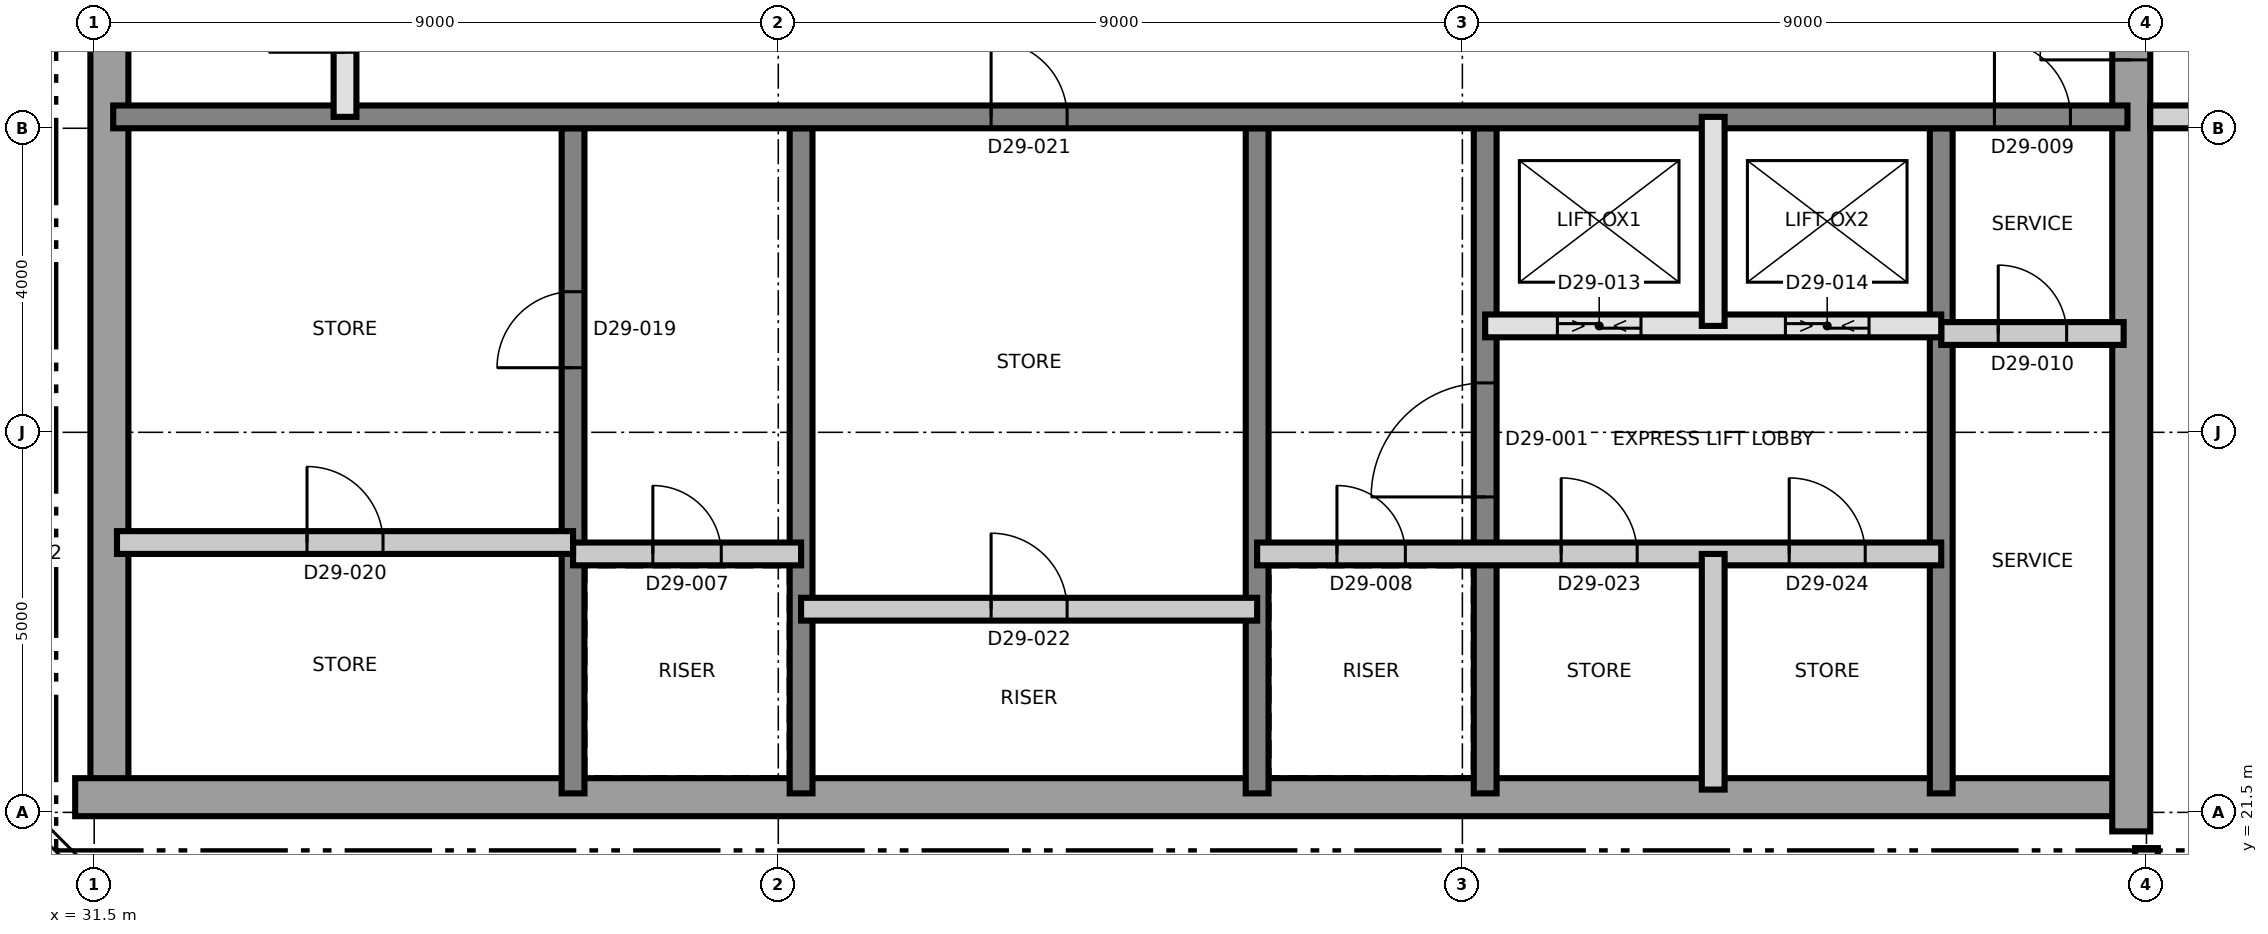
"""IFC4 building model, lengths in metres.
Left out: names, types, materials, properties, quantities, classifications, styles, units other than length and angle.
Written with IfcOpenShell. Run it as: python <this file> out.ifc"""

import sys

from ifc_helpers import new_model, si_unit, direction, frame, frame_2d, origin, place, context, subcontext, project, spatial, rectangle, extrude, element, fill, save


model = new_model("IFC4")
c1 = context("Model", 3, precision=1e-05, world=origin(), true_north=direction((0.0, 1.0)))
c2 = subcontext(c1, "Body", "Model", "MODEL_VIEW")
j1 = project(units=[si_unit("LENGTHUNIT", "METRE"), si_unit("PLANEANGLEUNIT", "RADIAN")], contexts=[c1])
p1 = place(None, origin())
s1 = spatial("IfcSite", under=j1, at=p1, CompositionType="ELEMENT")
p2 = place(p1, origin())
s2 = spatial("IfcBuilding", under=s1, at=p2, CompositionType="ELEMENT")
p3 = place(p2, frame((0.0, 0.0, 254.9)))
s3 = spatial("IfcBuildingStorey", under=s2, at=p3, CompositionType="ELEMENT", Elevation=254.9)
p4 = place(p3, frame((31.7, 21.75, 0.0), z_axis=(0.0, 0.0, 1.0), x_axis=(0.0, 1.0, 0.0)))
e1 = element("IfcWall", 1, at=p4, inside=s3, PredefinedType="SHEAR", context=c2, shape_type="SweptSolid", body=[
    extrude(rectangle(XDim=17.5, YDim=0.5, at=frame_2d((8.75, 0.0))), origin(), (0.0, 0.0, 1.0), 6.0),
])
p5 = place(p3, frame((31.25, 21.7, 0.0), z_axis=(0.0, 0.0, 1.0), x_axis=(1.0, 0.0, 0.0)))
e2 = element("IfcWall", 2, at=p5, inside=s3, PredefinedType="SHEAR", context=c2, shape_type="SweptSolid", body=[
    extrude(rectangle(XDim=27.0, YDim=0.5, at=frame_2d((13.5, 0.0))), origin(), (0.0, 0.0, 1.0), 6.0),
])
p6 = place(p3, frame((58.3, 21.25, 0.0), z_axis=(0.0, 0.0, 1.0), x_axis=(0.0, 1.0, 0.0)))
e3 = element("IfcWall", 3, at=p6, inside=s3, PredefinedType="SHEAR", context=c2, shape_type="SweptSolid", body=[
    extrude(rectangle(XDim=18.5, YDim=0.5, at=frame_2d((9.25, 0.0))), origin(), (0.0, 0.0, 1.0), 6.0),
])
p7 = place(p6, frame((10.15, 0.0, 0.0)))
e4 = element("IfcOpeningElement", 4, at=p7, cuts=e3, PredefinedType="OPENING", context=c2, shape_type="SweptSolid", body=[
    extrude(rectangle(XDim=1.2, YDim=2.1, at=frame_2d((0.6, 1.05))), frame((0.0, 0.26, 0.0), z_axis=(0.0, -1.0, 0.0), x_axis=(1.0, 0.0, 0.0)), (0.0, 0.0, 1.0), 0.52),
])
p8 = place(p3, frame((37.8, 21.75, 0.0), z_axis=(0.0, 0.0, 1.0), x_axis=(0.0, 1.0, 0.0)))
e5 = element("IfcWall", 5, at=p8, inside=s3, PredefinedType="SHEAR", context=c2, shape_type="SweptSolid", body=[
    extrude(rectangle(XDim=8.75, YDim=0.3, at=frame_2d((4.375, 0.0))), origin(), (0.0, 0.0, 1.0), 6.0),
])
p9 = place(p8, frame((5.6, 0.0, 0.0)))
e6 = element("IfcOpeningElement", 6, at=p9, cuts=e5, PredefinedType="OPENING", context=c2, shape_type="SweptSolid", body=[
    extrude(rectangle(XDim=1.0, YDim=2.1, at=frame_2d((0.5, 1.05))), frame((0.0, 0.16, 0.0), z_axis=(0.0, -1.0, 0.0), x_axis=(1.0, 0.0, 0.0)), (0.0, 0.0, 1.0), 0.32),
])
for number, where, z_axis, x_axis in (
    (7, (40.8, 21.75, 0.0), (0.0, 0.0, 1.0), (0.0, 1.0, 0.0)),
    (8, (46.8, 21.75, 0.0), (0.0, 0.0, 1.0), (0.0, 1.0, 0.0)),
):
    element("IfcWall", number, at=place(p3, frame(where, z_axis=z_axis, x_axis=x_axis)), inside=s3, PredefinedType="SHEAR", context=c2, shape_type="SweptSolid", body=[
        extrude(rectangle(XDim=8.75, YDim=0.3, at=frame_2d((4.375, 0.0))), origin(), (0.0, 0.0, 1.0), 6.0),
    ])
p10 = place(p3, frame((49.8, 21.75, 0.0), z_axis=(0.0, 0.0, 1.0), x_axis=(0.0, 1.0, 0.0)))
e9 = element("IfcWall", 9, at=p10, inside=s3, PredefinedType="SHEAR", context=c2, shape_type="SweptSolid", body=[
    extrude(rectangle(XDim=8.75, YDim=0.3, at=frame_2d((4.375, 0.0))), origin(), (0.0, 0.0, 1.0), 6.0),
])
p11 = place(p10, frame((3.9, 0.0, 0.0)))
e10 = element("IfcOpeningElement", 10, at=p11, cuts=e9, PredefinedType="OPENING", context=c2, shape_type="SweptSolid", body=[
    extrude(rectangle(XDim=1.5, YDim=2.1, at=frame_2d((0.75, 1.05))), frame((0.0, 0.16, 0.0), z_axis=(0.0, -1.0, 0.0), x_axis=(1.0, 0.0, 0.0)), (0.0, 0.0, 1.0), 0.32),
])
p12 = place(p3, frame((55.8, 21.75, 0.0), z_axis=(0.0, 0.0, 1.0), x_axis=(0.0, 1.0, 0.0)))
e11 = element("IfcWall", 11, at=p12, inside=s3, PredefinedType="SHEAR", context=c2, shape_type="SweptSolid", body=[
    extrude(rectangle(XDim=8.75, YDim=0.3, at=frame_2d((4.375, 0.0))), origin(), (0.0, 0.0, 1.0), 6.0),
])
p13 = place(p3, frame((31.75, 30.65, 0.0), z_axis=(0.0, 0.0, 1.0), x_axis=(1.0, 0.0, 0.0)))
e12 = element("IfcWall", 12, at=p13, inside=s3, PredefinedType="SHEAR", context=c2, shape_type="SweptSolid", body=[
    extrude(rectangle(XDim=26.5, YDim=0.3, at=frame_2d((13.25, 0.0))), origin(), (0.0, 0.0, 1.0), 6.0),
])
p14 = place(p13, frame((24.75, 0.0, 0.0)))
e13 = element("IfcOpeningElement", 13, at=p14, cuts=e12, PredefinedType="OPENING", context=c2, shape_type="SweptSolid", body=[
    extrude(rectangle(XDim=1.0, YDim=2.1, at=frame_2d((0.5, 1.05))), frame((0.0, 0.16, 0.0), z_axis=(0.0, -1.0, 0.0), x_axis=(1.0, 0.0, 0.0)), (0.0, 0.0, 1.0), 0.32),
])
p15 = place(p13, frame((11.55, 0.0, 0.0)))
e14 = element("IfcOpeningElement", 14, at=p15, cuts=e12, PredefinedType="OPENING", context=c2, shape_type="SweptSolid", body=[
    extrude(rectangle(XDim=1.0, YDim=2.1, at=frame_2d((0.5, 1.05))), frame((0.0, 0.16, 0.0), z_axis=(0.0, -1.0, 0.0), x_axis=(1.0, 0.0, 0.0)), (0.0, 0.0, 1.0), 0.32),
])
p16 = place(p3, frame((40.8, 24.173, 0.0), z_axis=(0.0, 0.0, 1.0), x_axis=(1.0, 0.0, 0.0)))
e15 = element("IfcWall", 15, at=p16, inside=s3, PredefinedType="PARTITIONING", context=c2, shape_type="SweptSolid", body=[
    extrude(rectangle(XDim=6.0, YDim=0.3, at=frame_2d((3.0, 0.0))), origin(), (0.0, 0.0, 1.0), 5.7),
])
p17 = place(p16, frame((2.5, 0.0, 0.0)))
e16 = element("IfcOpeningElement", 16, at=p17, cuts=e15, PredefinedType="OPENING", context=c2, shape_type="SweptSolid", body=[
    extrude(rectangle(XDim=1.0, YDim=2.1, at=frame_2d((0.5, 1.05))), frame((0.0, 0.16, 0.0), z_axis=(0.0, -1.0, 0.0), x_axis=(1.0, 0.0, 0.0)), (0.0, 0.0, 1.0), 0.32),
])
p18 = place(p3, frame((37.8, 24.9, 0.0), z_axis=(0.0, 0.0, 1.0), x_axis=(1.0, 0.0, 0.0)))
e17 = element("IfcWall", 17, at=p18, inside=s3, PredefinedType="PARTITIONING", context=c2, shape_type="SweptSolid", body=[
    extrude(rectangle(XDim=3.0, YDim=0.3, at=frame_2d((1.5, 0.0))), origin(), (0.0, 0.0, 1.0), 5.7),
])
p19 = place(p18, frame((1.05, 0.0, 0.0)))
e18 = element("IfcOpeningElement", 18, at=p19, cuts=e17, PredefinedType="OPENING", context=c2, shape_type="SweptSolid", body=[
    extrude(rectangle(XDim=0.9, YDim=2.1, at=frame_2d((0.45, 1.05))), frame((0.0, 0.16, 0.0), z_axis=(0.0, -1.0, 0.0), x_axis=(1.0, 0.0, 0.0)), (0.0, 0.0, 1.0), 0.32),
])
p20 = place(p3, frame((46.8, 24.9, 0.0), z_axis=(0.0, 0.0, 1.0), x_axis=(1.0, 0.0, 0.0)))
e19 = element("IfcWall", 19, at=p20, inside=s3, PredefinedType="PARTITIONING", context=c2, shape_type="SweptSolid", body=[
    extrude(rectangle(XDim=9.0, YDim=0.3, at=frame_2d((4.5, 0.0))), origin(), (0.0, 0.0, 1.0), 5.7),
])
p21 = place(p20, frame((1.05, 0.0, 0.0)))
e20 = element("IfcOpeningElement", 20, at=p21, cuts=e19, PredefinedType="OPENING", context=c2, shape_type="SweptSolid", body=[
    extrude(rectangle(XDim=0.9, YDim=2.1, at=frame_2d((0.45, 1.05))), frame((0.0, 0.16, 0.0), z_axis=(0.0, -1.0, 0.0), x_axis=(1.0, 0.0, 0.0)), (0.0, 0.0, 1.0), 0.32),
])
p22 = place(p20, frame((4.0, 0.0, 0.0)))
e21 = element("IfcOpeningElement", 21, at=p22, cuts=e19, PredefinedType="OPENING", context=c2, shape_type="SweptSolid", body=[
    extrude(rectangle(XDim=1.0, YDim=2.1, at=frame_2d((0.5, 1.05))), frame((0.0, 0.16, 0.0), z_axis=(0.0, -1.0, 0.0), x_axis=(1.0, 0.0, 0.0)), (0.0, 0.0, 1.0), 0.32),
])
p23 = place(p20, frame((7.0, 0.0, 0.0)))
e22 = element("IfcOpeningElement", 22, at=p23, cuts=e19, PredefinedType="OPENING", context=c2, shape_type="SweptSolid", body=[
    extrude(rectangle(XDim=1.0, YDim=2.1, at=frame_2d((0.5, 1.05))), frame((0.0, 0.16, 0.0), z_axis=(0.0, -1.0, 0.0), x_axis=(1.0, 0.0, 0.0)), (0.0, 0.0, 1.0), 0.32),
])
p24 = place(p3, frame((31.8, 25.05, 0.0), z_axis=(0.0, 0.0, 1.0), x_axis=(1.0, 0.0, 0.0)))
e23 = element("IfcWall", 23, at=p24, inside=s3, PredefinedType="PARTITIONING", context=c2, shape_type="SweptSolid", body=[
    extrude(rectangle(XDim=6.0, YDim=0.3, at=frame_2d((3.0, 0.0))), origin(), (0.0, 0.0, 1.0), 5.7),
])
p25 = place(p24, frame((2.5, 0.0, 0.0)))
e24 = element("IfcOpeningElement", 24, at=p25, cuts=e23, PredefinedType="OPENING", context=c2, shape_type="SweptSolid", body=[
    extrude(rectangle(XDim=1.0, YDim=2.1, at=frame_2d((0.5, 1.05))), frame((0.0, 0.16, 0.0), z_axis=(0.0, -1.0, 0.0), x_axis=(1.0, 0.0, 0.0)), (0.0, 0.0, 1.0), 0.32),
])
p26 = place(p3, frame((55.8, 27.8, 0.0), z_axis=(0.0, 0.0, 1.0), x_axis=(1.0, 0.0, 0.0)))
e25 = element("IfcWall", 25, at=p26, inside=s3, PredefinedType="PARTITIONING", context=c2, shape_type="SweptSolid", body=[
    extrude(rectangle(XDim=2.4, YDim=0.3, at=frame_2d((1.2, 0.0))), origin(), (0.0, 0.0, 1.0), 5.7),
])
p27 = place(p26, frame((0.75, 0.0, 0.0)))
e26 = element("IfcOpeningElement", 26, at=p27, cuts=e25, PredefinedType="OPENING", context=c2, shape_type="SweptSolid", body=[
    extrude(rectangle(XDim=0.9, YDim=2.1, at=frame_2d((0.45, 1.05))), frame((0.0, 0.16, 0.0), z_axis=(0.0, -1.0, 0.0), x_axis=(1.0, 0.0, 0.0)), (0.0, 0.0, 1.0), 0.32),
])
p28 = place(p3, frame((49.8, 27.9, 0.0), z_axis=(0.0, 0.0, 1.0), x_axis=(1.0, 0.0, 0.0)))
e27 = element("IfcWall", 27, at=p28, inside=s3, PredefinedType="SOLIDWALL", context=c2, shape_type="SweptSolid", body=[
    extrude(rectangle(XDim=6.0, YDim=0.3, at=frame_2d((3.0, 0.0))), origin(), (0.0, 0.0, 1.0), 5.7),
])
p29 = place(p28, frame((0.95, 0.0, 0.0)))
e28 = element("IfcOpeningElement", 28, at=p29, cuts=e27, PredefinedType="OPENING", context=c2, shape_type="SweptSolid", body=[
    extrude(rectangle(XDim=1.1, YDim=2.4, at=frame_2d((0.55, 1.2))), frame((0.0, 0.16, 0.0), z_axis=(0.0, -1.0, 0.0), x_axis=(1.0, 0.0, 0.0)), (0.0, 0.0, 1.0), 0.32),
])
p30 = place(p28, frame((3.95, 0.0, 0.0)))
e29 = element("IfcOpeningElement", 29, at=p30, cuts=e27, PredefinedType="OPENING", context=c2, shape_type="SweptSolid", body=[
    extrude(rectangle(XDim=1.1, YDim=2.4, at=frame_2d((0.55, 1.2))), frame((0.0, 0.16, 0.0), z_axis=(0.0, -1.0, 0.0), x_axis=(1.0, 0.0, 0.0)), (0.0, 0.0, 1.0), 0.32),
])
p31 = place(p3, frame((34.8, 30.65, 0.0), z_axis=(0.0, 0.0, 1.0), x_axis=(0.0, 1.0, 0.0)))
e30 = element("IfcWall", 30, at=p31, inside=s3, PredefinedType="SOLIDWALL", context=c2, shape_type="SweptSolid", body=[
    extrude(rectangle(XDim=2.7, YDim=0.3, at=frame_2d((1.35, 0.0))), origin(), (0.0, 0.0, 1.0), 5.7),
])
p32 = place(p31, frame((0.85, 0.0, 0.0)))
e31 = element("IfcOpeningElement", 31, at=p32, cuts=e30, PredefinedType="OPENING", context=c2, shape_type="SweptSolid", body=[
    extrude(rectangle(XDim=1.0, YDim=2.1, at=frame_2d((0.5, 1.05))), frame((0.0, 0.16, 0.0), z_axis=(0.0, -1.0, 0.0), x_axis=(1.0, 0.0, 0.0)), (0.0, 0.0, 1.0), 0.32),
])
p33 = place(p3, frame((52.8, 21.8, 0.0), z_axis=(0.0, 0.0, 1.0), x_axis=(0.0, 1.0, 0.0)))
e32 = element("IfcWall", 32, at=p33, inside=s3, PredefinedType="PARTITIONING", context=c2, shape_type="SweptSolid", body=[
    extrude(rectangle(XDim=3.1, YDim=0.3, at=frame_2d((1.55, 0.0))), origin(), (0.0, 0.0, 1.0), 5.7),
])
p34 = place(p3, frame((52.8, 27.9, 0.0), z_axis=(0.0, 0.0, 1.0), x_axis=(0.0, 1.0, 0.0)))
e33 = element("IfcWall", 33, at=p34, inside=s3, PredefinedType="SOLIDWALL", context=c2, shape_type="SweptSolid", body=[
    extrude(rectangle(XDim=2.75, YDim=0.3, at=frame_2d((1.375, 0.0))), origin(), (0.0, 0.0, 1.0), 5.7),
])
p35 = place(p3, frame((58.55, 30.65, 0.0), z_axis=(0.0, 0.0, 1.0), x_axis=(1.0, 0.0, 0.0)))
e34 = element("IfcWall", 34, at=p35, inside=s3, PredefinedType="PARTITIONING", context=c2, shape_type="SweptSolid", body=[
    extrude(rectangle(XDim=26.78, YDim=0.3, at=frame_2d((13.39, 0.0))), origin(), (0.0, 0.0, 1.0), 5.7),
])
p36 = place(p35, frame((3.75, 0.0, 0.0)))
e35 = element("IfcOpeningElement", 35, at=p36, cuts=e34, PredefinedType="OPENING", context=c2, shape_type="SweptSolid", body=[
    extrude(rectangle(XDim=1.4, YDim=2.1, at=frame_2d((0.7, 1.05))), frame((0.0, 0.16, 0.0), z_axis=(0.0, -1.0, 0.0), x_axis=(1.0, 0.0, 0.0)), (0.0, 0.0, 1.0), 0.32),
])
p37 = place(p35, frame((12.75, 0.0, 0.0)))
e36 = element("IfcOpeningElement", 36, at=p37, cuts=e34, PredefinedType="OPENING", context=c2, shape_type="SweptSolid", body=[
    extrude(rectangle(XDim=1.4, YDim=2.1, at=frame_2d((0.7, 1.05))), frame((0.0, 0.16, 0.0), z_axis=(0.0, -1.0, 0.0), x_axis=(1.0, 0.0, 0.0)), (0.0, 0.0, 1.0), 0.32),
])
p38 = place(p35, frame((21.85, 0.0, 0.0)))
e37 = element("IfcOpeningElement", 37, at=p38, cuts=e34, PredefinedType="OPENING", context=c2, shape_type="SweptSolid", body=[
    extrude(rectangle(XDim=1.2, YDim=2.1, at=frame_2d((0.6, 1.05))), frame((0.0, 0.16, 0.0), z_axis=(0.0, -1.0, 0.0), x_axis=(1.0, 0.0, 0.0)), (0.0, 0.0, 1.0), 0.32),
])
p39 = place(p3, frame((58.5, 19.77, 0.0), z_axis=(0.0, 0.0, 1.0), x_axis=(0.0, 1.0, 0.0)))
e38 = element("IfcWall", 38, at=p39, inside=s3, PredefinedType="PARTITIONING", context=c2, shape_type="SweptSolid", body=[
    extrude(rectangle(XDim=1.26, YDim=0.3, at=frame_2d((0.63, 0.0))), origin(), (0.0, 0.0, 1.0), 5.65),
])
p40 = place(p11, origin())
e39 = element("IfcDoor", 39, at=p40, inside=s3, OperationType="SINGLE_SWING_LEFT", PredefinedType="DOOR", context=c2, shape_type="SweptSolid", body=[
    extrude(rectangle(XDim=1.5, YDim=2.1, at=frame_2d((0.75, 1.05))), frame((0.0, 0.025, 0.0), z_axis=(0.0, -1.0, 0.0), x_axis=(1.0, 0.0, 0.0)), (0.0, 0.0, 1.0), 0.05),
])
fill(e10, e39)
p41 = place(p19, origin())
e40 = element("IfcDoor", 40, at=p41, inside=s3, OperationType="SINGLE_SWING_LEFT", PredefinedType="DOOR", context=c2, shape_type="SweptSolid", body=[
    extrude(rectangle(XDim=0.9, YDim=2.1, at=frame_2d((0.45, 1.05))), frame((0.0, 0.025, 0.0), z_axis=(0.0, -1.0, 0.0), x_axis=(1.0, 0.0, 0.0)), (0.0, 0.0, 1.0), 0.05),
])
fill(e18, e40)
p42 = place(p21, origin())
e41 = element("IfcDoor", 41, at=p42, inside=s3, OperationType="SINGLE_SWING_RIGHT", PredefinedType="DOOR", context=c2, shape_type="SweptSolid", body=[
    extrude(rectangle(XDim=0.9, YDim=2.1, at=frame_2d((0.45, 1.05))), frame((0.0, 0.025, 0.0), z_axis=(0.0, -1.0, 0.0), x_axis=(1.0, 0.0, 0.0)), (0.0, 0.0, 1.0), 0.05),
])
fill(e20, e41)
p43 = place(p14, origin())
e42 = element("IfcDoor", 42, at=p43, inside=s3, OperationType="SINGLE_SWING_LEFT", PredefinedType="DOOR", context=c2, shape_type="SweptSolid", body=[
    extrude(rectangle(XDim=1.0, YDim=2.1, at=frame_2d((0.5, 1.05))), frame((0.0, 0.025, 0.0), z_axis=(0.0, -1.0, 0.0), x_axis=(1.0, 0.0, 0.0)), (0.0, 0.0, 1.0), 0.05),
])
fill(e13, e42)
p44 = place(p27, origin())
e43 = element("IfcDoor", 43, at=p44, inside=s3, OperationType="SINGLE_SWING_RIGHT", PredefinedType="DOOR", context=c2, shape_type="SweptSolid", body=[
    extrude(rectangle(XDim=0.9, YDim=2.1, at=frame_2d((0.45, 1.05))), frame((0.0, 0.025, 0.0), z_axis=(0.0, -1.0, 0.0), x_axis=(1.0, 0.0, 0.0)), (0.0, 0.0, 1.0), 0.05),
])
fill(e26, e43)
p45 = place(p7, origin())
e44 = element("IfcDoor", 44, at=p45, inside=s3, OperationType="SINGLE_SWING_LEFT", PredefinedType="DOOR", context=c2, shape_type="SweptSolid", body=[
    extrude(rectangle(XDim=1.2, YDim=2.1, at=frame_2d((0.6, 1.05))), frame((0.0, 0.025, 0.0), z_axis=(0.0, -1.0, 0.0), x_axis=(1.0, 0.0, 0.0)), (0.0, 0.0, 1.0), 0.05),
])
fill(e4, e44)
p46 = place(p29, origin())
e45 = element("IfcDoor", 45, at=p46, inside=s3, OperationType="SLIDING_TO_LEFT", PredefinedType="DOOR", context=c2, shape_type="SweptSolid", body=[
    extrude(rectangle(XDim=1.1, YDim=2.4, at=frame_2d((0.55, 1.2))), frame((0.0, 0.025, 0.0), z_axis=(0.0, -1.0, 0.0), x_axis=(1.0, 0.0, 0.0)), (0.0, 0.0, 1.0), 0.05),
])
fill(e28, e45)
p47 = place(p30, origin())
e46 = element("IfcDoor", 46, at=p47, inside=s3, OperationType="SLIDING_TO_LEFT", PredefinedType="DOOR", context=c2, shape_type="SweptSolid", body=[
    extrude(rectangle(XDim=1.1, YDim=2.4, at=frame_2d((0.55, 1.2))), frame((0.0, 0.025, 0.0), z_axis=(0.0, -1.0, 0.0), x_axis=(1.0, 0.0, 0.0)), (0.0, 0.0, 1.0), 0.05),
])
fill(e29, e46)
p48 = place(p9, origin())
e47 = element("IfcDoor", 47, at=p48, inside=s3, OperationType="SINGLE_SWING_LEFT", PredefinedType="DOOR", context=c2, shape_type="SweptSolid", body=[
    extrude(rectangle(XDim=1.0, YDim=2.1, at=frame_2d((0.5, 1.05))), frame((0.0, 0.025, 0.0), z_axis=(0.0, -1.0, 0.0), x_axis=(1.0, 0.0, 0.0)), (0.0, 0.0, 1.0), 0.05),
])
fill(e6, e47)
p49 = place(p25, origin())
e48 = element("IfcDoor", 48, at=p49, inside=s3, OperationType="SINGLE_SWING_RIGHT", PredefinedType="DOOR", context=c2, shape_type="SweptSolid", body=[
    extrude(rectangle(XDim=1.0, YDim=2.1, at=frame_2d((0.5, 1.05))), frame((0.0, 0.025, 0.0), z_axis=(0.0, -1.0, 0.0), x_axis=(1.0, 0.0, 0.0)), (0.0, 0.0, 1.0), 0.05),
])
fill(e24, e48)
p50 = place(p15, origin())
e49 = element("IfcDoor", 49, at=p50, inside=s3, OperationType="SINGLE_SWING_LEFT", PredefinedType="DOOR", context=c2, shape_type="SweptSolid", body=[
    extrude(rectangle(XDim=1.0, YDim=2.1, at=frame_2d((0.5, 1.05))), frame((0.0, 0.025, 0.0), z_axis=(0.0, -1.0, 0.0), x_axis=(1.0, 0.0, 0.0)), (0.0, 0.0, 1.0), 0.05),
])
fill(e14, e49)
p51 = place(p17, origin())
e50 = element("IfcDoor", 50, at=p51, inside=s3, OperationType="SINGLE_SWING_RIGHT", PredefinedType="DOOR", context=c2, shape_type="SweptSolid", body=[
    extrude(rectangle(XDim=1.0, YDim=2.1, at=frame_2d((0.5, 1.05))), frame((0.0, 0.025, 0.0), z_axis=(0.0, -1.0, 0.0), x_axis=(1.0, 0.0, 0.0)), (0.0, 0.0, 1.0), 0.05),
])
fill(e16, e50)
p52 = place(p22, origin())
e51 = element("IfcDoor", 51, at=p52, inside=s3, OperationType="SINGLE_SWING_LEFT", PredefinedType="DOOR", context=c2, shape_type="SweptSolid", body=[
    extrude(rectangle(XDim=1.0, YDim=2.1, at=frame_2d((0.5, 1.05))), frame((0.0, 0.025, 0.0), z_axis=(0.0, -1.0, 0.0), x_axis=(1.0, 0.0, 0.0)), (0.0, 0.0, 1.0), 0.05),
])
fill(e21, e51)
p53 = place(p23, origin())
e52 = element("IfcDoor", 52, at=p53, inside=s3, OperationType="SINGLE_SWING_RIGHT", PredefinedType="DOOR", context=c2, shape_type="SweptSolid", body=[
    extrude(rectangle(XDim=1.0, YDim=2.1, at=frame_2d((0.5, 1.05))), frame((0.0, 0.025, 0.0), z_axis=(0.0, -1.0, 0.0), x_axis=(1.0, 0.0, 0.0)), (0.0, 0.0, 1.0), 0.05),
])
fill(e22, e52)
save(model, sys.argv[1])
